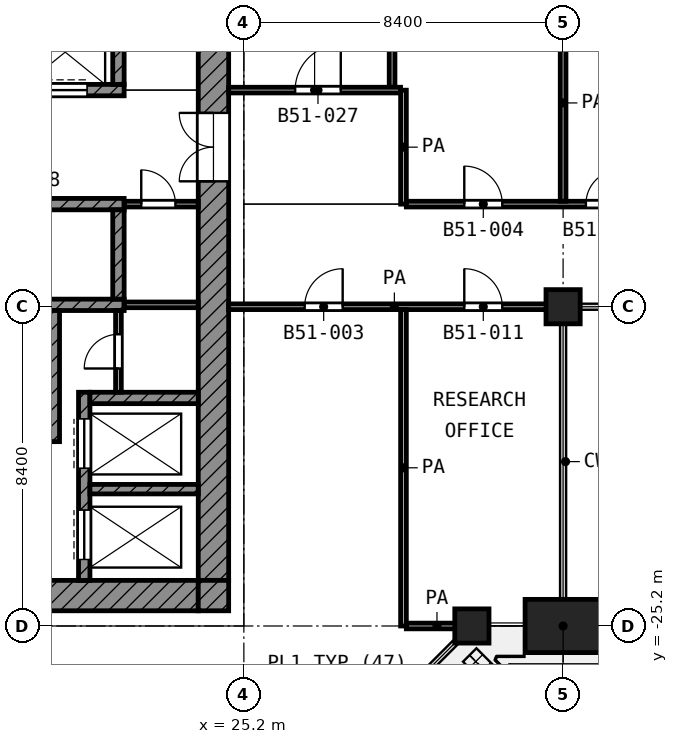
"""IFC4 building model, lengths in metres.
Left out: names, types, materials, properties, quantities, classifications, styles, units other than length and angle.
Written with IfcOpenShell. Run it as: python <this file> out.ifc"""

import sys

from ifc_helpers import new_model, si_unit, direction, frame, frame_2d, origin, origin_2d, place, context, subcontext, project, spatial, rectangle, extrude, element, fill, save


model = new_model("IFC4")
c1 = context("Model", 3, precision=1e-05, world=origin(), true_north=direction((0.0, 1.0)))
c2 = subcontext(c1, "Body", "Model", "MODEL_VIEW")
j1 = project(units=[si_unit("LENGTHUNIT", "METRE"), si_unit("PLANEANGLEUNIT", "RADIAN")], contexts=[c1])
p1 = place(None, origin())
s1 = spatial("IfcSite", under=j1, at=p1, CompositionType="ELEMENT")
p2 = place(p1, origin())
s2 = spatial("IfcBuilding", under=s1, at=p2, CompositionType="ELEMENT")
p3 = place(p2, frame((0.0, 0.0, 222.2)))
s3 = spatial("IfcBuildingStorey", under=s2, at=p3, CompositionType="ELEMENT", Elevation=222.2)
for number, where, z_axis, x_axis in (
    (1, (33.6, -16.8, 0.0), (0.0, 0.0, 1.0), (1.0, 0.0, 0.0)),
    (2, (31.2, -25.2, 0.0), (0.0, 0.0, 1.0), (1.0, 0.0, 0.0)),
):
    element("IfcColumn", number, at=place(p3, frame(where, z_axis=z_axis, x_axis=x_axis)), inside=s3, PredefinedType="COLUMN", context=c2, shape_type="SweptSolid", body=[
        extrude(rectangle(XDim=0.9, YDim=0.9, at=origin_2d()), origin(), (0.0, 0.0, 1.0), 4.2),
    ])
p4 = place(p3, frame((33.6, -25.2, 0.0), z_axis=(0.0, 0.0, 1.0), x_axis=(-1.0, 0.0, 0.0)))
e3 = element("IfcColumn", 3, at=p4, inside=s3, PredefinedType="COLUMN", context=c2, shape_type="SweptSolid", body=[
    extrude(rectangle(XDim=2.0, YDim=1.4, at=origin_2d()), origin(), (0.0, 0.0, 1.0), 4.2),
])
p5 = place(p3, frame((24.4, -24.0, 0.0), z_axis=(0.0, 0.0, 1.0), x_axis=(0.0, 1.0, 0.0)))
e4 = element("IfcWall", 4, at=p5, inside=s3, PredefinedType="SHEAR", context=c2, shape_type="SweptSolid", body=[
    extrude(rectangle(XDim=18.6, YDim=0.8, at=frame_2d((9.3, 0.0))), origin(), (0.0, 0.0, 1.0), 3.6),
])
p6 = place(p5, frame((10.5, 0.0, 0.0)))
e5 = element("IfcOpeningElement", 5, at=p6, cuts=e4, PredefinedType="OPENING", context=c2, shape_type="SweptSolid", body=[
    extrude(rectangle(XDim=1.8, YDim=2.1, at=frame_2d((0.9, 1.05))), frame((0.0, 0.41, 0.0), z_axis=(0.0, -1.0, 0.0), x_axis=(1.0, 0.0, 0.0)), (0.0, 0.0, 1.0), 0.82),
])
p7 = place(p3, frame((5.4, -24.4, 0.0), z_axis=(0.0, 0.0, 1.0), x_axis=(1.0, 0.0, 0.0)))
e6 = element("IfcWall", 6, at=p7, inside=s3, PredefinedType="SHEAR", context=c2, shape_type="SweptSolid", body=[
    extrude(rectangle(XDim=18.6, YDim=0.8, at=frame_2d((9.3, 0.0))), origin(), (0.0, 0.0, 1.0), 3.6),
])
p8 = place(p7, frame((6.3, 0.0, 0.0)))
e7 = element("IfcOpeningElement", 7, at=p8, cuts=e6, PredefinedType="OPENING", context=c2, shape_type="SweptSolid", body=[
    extrude(rectangle(XDim=1.8, YDim=2.1, at=frame_2d((0.9, 1.05))), frame((0.0, 0.41, 0.0), z_axis=(0.0, -1.0, 0.0), x_axis=(1.0, 0.0, 0.0)), (0.0, 0.0, 1.0), 0.82),
])
p9 = place(p3, frame((24.4, -24.8, 0.0), z_axis=(0.0, 0.0, 1.0), x_axis=(0.0, 1.0, 0.0)))
e8 = element("IfcWall", 8, at=p9, inside=s3, PredefinedType="SHEAR", context=c2, shape_type="SweptSolid", body=[
    extrude(rectangle(XDim=0.8, YDim=0.8, at=frame_2d((0.4, 0.0))), origin(), (0.0, 0.0, 1.0), 3.6),
])
p10 = place(p3, frame((5.4, -11.1, 0.0), z_axis=(0.0, 0.0, 1.0), x_axis=(1.0, 0.0, 0.0)))
e9 = element("IfcWall", 9, at=p10, inside=s3, PredefinedType="SHEAR", context=c2, shape_type="SweptSolid", body=[
    extrude(rectangle(XDim=16.65, YDim=0.3, at=frame_2d((8.325, 0.0))), origin(), (0.0, 0.0, 1.0), 3.6),
])
p11 = place(p10, frame((11.825, 0.0, 0.0)))
e10 = element("IfcOpeningElement", 10, at=p11, cuts=e9, PredefinedType="OPENING", context=c2, shape_type="SweptSolid", body=[
    extrude(rectangle(XDim=1.1, YDim=2.1, at=frame_2d((0.55, 1.05))), frame((0.0, 0.16, 0.0), z_axis=(0.0, -1.0, 0.0), x_axis=(1.0, 0.0, 0.0)), (0.0, 0.0, 1.0), 0.32),
])
p12 = place(p10, frame((14.575, 0.0, 0.0)))
e11 = element("IfcOpeningElement", 11, at=p12, cuts=e9, PredefinedType="OPENING", context=c2, shape_type="SweptSolid", body=[
    extrude(rectangle(XDim=1.1, YDim=2.1, at=frame_2d((0.55, 1.05))), frame((0.0, 0.16, 0.0), z_axis=(0.0, -1.0, 0.0), x_axis=(1.0, 0.0, 0.0)), (0.0, 0.0, 1.0), 0.32),
])
p13 = place(p10, frame((3.675, 0.0, 0.0)))
e12 = element("IfcOpeningElement", 12, at=p13, cuts=e9, PredefinedType="OPENING", context=c2, shape_type="SweptSolid", body=[
    extrude(rectangle(XDim=0.9, YDim=2.1, at=frame_2d((0.45, 1.05))), frame((0.0, 0.16, 0.0), z_axis=(0.0, -1.0, 0.0), x_axis=(1.0, 0.0, 0.0)), (0.0, 0.0, 1.0), 0.32),
])
p14 = place(p10, frame((9.175, 0.0, 0.0)))
e13 = element("IfcOpeningElement", 13, at=p14, cuts=e9, PredefinedType="OPENING", context=c2, shape_type="SweptSolid", body=[
    extrude(rectangle(XDim=0.9, YDim=2.1, at=frame_2d((0.45, 1.05))), frame((0.0, 0.16, 0.0), z_axis=(0.0, -1.0, 0.0), x_axis=(1.0, 0.0, 0.0)), (0.0, 0.0, 1.0), 0.32),
])
p15 = place(p3, frame((5.4, -14.1, 0.0), z_axis=(0.0, 0.0, 1.0), x_axis=(1.0, 0.0, 0.0)))
e14 = element("IfcWall", 14, at=p15, inside=s3, PredefinedType="SHEAR", context=c2, shape_type="SweptSolid", body=[
    extrude(rectangle(XDim=16.65, YDim=0.3, at=frame_2d((8.325, 0.0))), origin(), (0.0, 0.0, 1.0), 3.6),
])
p16 = place(p15, frame((0.825, 0.0, 0.0)))
e15 = element("IfcOpeningElement", 15, at=p16, cuts=e14, PredefinedType="OPENING", context=c2, shape_type="SweptSolid", body=[
    extrude(rectangle(XDim=1.1, YDim=2.1, at=frame_2d((0.55, 1.05))), frame((0.0, 0.16, 0.0), z_axis=(0.0, -1.0, 0.0), x_axis=(1.0, 0.0, 0.0)), (0.0, 0.0, 1.0), 0.32),
])
p17 = place(p15, frame((3.575, 0.0, 0.0)))
e16 = element("IfcOpeningElement", 16, at=p17, cuts=e14, PredefinedType="OPENING", context=c2, shape_type="SweptSolid", body=[
    extrude(rectangle(XDim=1.1, YDim=2.1, at=frame_2d((0.55, 1.05))), frame((0.0, 0.16, 0.0), z_axis=(0.0, -1.0, 0.0), x_axis=(1.0, 0.0, 0.0)), (0.0, 0.0, 1.0), 0.32),
])
p18 = place(p3, frame((5.4, -16.75, 0.0), z_axis=(0.0, 0.0, 1.0), x_axis=(1.0, 0.0, 0.0)))
e17 = element("IfcWall", 17, at=p18, inside=s3, PredefinedType="SHEAR", context=c2, shape_type="SweptSolid", body=[
    extrude(rectangle(XDim=16.65, YDim=0.3, at=frame_2d((8.325, 0.0))), origin(), (0.0, 0.0, 1.0), 3.6),
])
p19 = place(p3, frame((20.2, -20.35, 0.0), z_axis=(0.0, 0.0, 1.0), x_axis=(0.0, 1.0, 0.0)))
e18 = element("IfcWall", 18, at=p19, inside=s3, PredefinedType="SHEAR", context=c2, shape_type="SweptSolid", body=[
    extrude(rectangle(XDim=3.45, YDim=0.3, at=frame_2d((1.725, 0.0))), origin(), (0.0, 0.0, 1.0), 3.6),
])
p20 = place(p3, frame((21.9, -10.95, 0.0), z_axis=(0.0, 0.0, 1.0), x_axis=(0.0, 1.0, 0.0)))
e19 = element("IfcWall", 19, at=p20, inside=s3, PredefinedType="SHEAR", context=c2, shape_type="SweptSolid", body=[
    extrude(rectangle(XDim=2.35, YDim=0.3, at=frame_2d((1.175, 0.0))), origin(), (0.0, 0.0, 1.0), 3.6),
])
p21 = place(p3, frame((21.9, -16.6, 0.0), z_axis=(0.0, 0.0, 1.0), x_axis=(0.0, 1.0, 0.0)))
e20 = element("IfcWall", 20, at=p21, inside=s3, PredefinedType="SHEAR", context=c2, shape_type="SweptSolid", body=[
    extrude(rectangle(XDim=2.35, YDim=0.3, at=frame_2d((1.175, 0.0))), origin(), (0.0, 0.0, 1.0), 3.6),
])
p22 = place(p3, frame((21.15, -19.2, 0.0), z_axis=(0.0, 0.0, 1.0), x_axis=(1.0, 0.0, 0.0)))
e21 = element("IfcWall", 21, at=p22, inside=s3, PredefinedType="SHEAR", context=c2, shape_type="SweptSolid", body=[
    extrude(rectangle(XDim=2.85, YDim=0.3, at=frame_2d((1.425, 0.0))), origin(), (0.0, 0.0, 1.0), 3.6),
])
p23 = place(p3, frame((21.0, -24.0, 0.0), z_axis=(0.0, 0.0, 1.0), x_axis=(0.0, 1.0, 0.0)))
e22 = element("IfcWall", 22, at=p23, inside=s3, PredefinedType="SHEAR", context=c2, shape_type="SweptSolid", body=[
    extrude(rectangle(XDim=4.95, YDim=0.3, at=frame_2d((2.475, 0.0))), origin(), (0.0, 0.0, 1.0), 3.6),
])
p24 = place(p23, frame((2.95, 0.0, 0.0)))
e23 = element("IfcOpeningElement", 23, at=p24, cuts=e22, PredefinedType="OPENING", context=c2, shape_type="SweptSolid", body=[
    extrude(rectangle(XDim=1.3, YDim=2.1, at=frame_2d((0.65, 1.05))), frame((0.0, 0.16, 0.0), z_axis=(0.0, -1.0, 0.0), x_axis=(1.0, 0.0, 0.0)), (0.0, 0.0, 1.0), 0.32),
])
p25 = place(p23, frame((0.55, 0.0, 0.0)))
e24 = element("IfcOpeningElement", 24, at=p25, cuts=e22, PredefinedType="OPENING", context=c2, shape_type="SweptSolid", body=[
    extrude(rectangle(XDim=1.3, YDim=2.1, at=frame_2d((0.65, 1.05))), frame((0.0, 0.16, 0.0), z_axis=(0.0, -1.0, 0.0), x_axis=(1.0, 0.0, 0.0)), (0.0, 0.0, 1.0), 0.32),
])
p26 = place(p3, frame((21.15, -21.6, 0.0), z_axis=(0.0, 0.0, 1.0), x_axis=(1.0, 0.0, 0.0)))
e25 = element("IfcWall", 25, at=p26, inside=s3, PredefinedType="SHEAR", context=c2, shape_type="SweptSolid", body=[
    extrude(rectangle(XDim=2.85, YDim=0.25, at=frame_2d((1.425, 0.0))), origin(), (0.0, 0.0, 1.0), 3.6),
])
p27 = place(p3, frame((21.9, -19.05, 0.0), z_axis=(0.0, 0.0, 1.0), x_axis=(0.0, 1.0, 0.0)))
e26 = element("IfcWall", 26, at=p27, inside=s3, PredefinedType="PARTITIONING", context=c2, shape_type="SweptSolid", body=[
    extrude(rectangle(XDim=2.15, YDim=0.15, at=frame_2d((1.075, 0.0))), origin(), (0.0, 0.0, 1.0), 3.6),
])
p28 = place(p27, frame((0.625, 0.0, 0.0)))
e27 = element("IfcOpeningElement", 27, at=p28, cuts=e26, PredefinedType="OPENING", context=c2, shape_type="SweptSolid", body=[
    extrude(rectangle(XDim=0.9, YDim=2.1, at=frame_2d((0.45, 1.05))), frame((0.0, 0.085, 0.0), z_axis=(0.0, -1.0, 0.0), x_axis=(1.0, 0.0, 0.0)), (0.0, 0.0, 1.0), 0.17),
])
p29 = place(p3, frame((22.05, -16.75, 0.0), z_axis=(0.0, 0.0, 1.0), x_axis=(1.0, 0.0, 0.0)))
e28 = element("IfcWall", 28, at=p29, inside=s3, PredefinedType="PARTITIONING", context=c2, shape_type="SweptSolid", body=[
    extrude(rectangle(XDim=1.95, YDim=0.15, at=frame_2d((0.975, 0.0))), origin(), (0.0, 0.0, 1.0), 3.6),
])
p30 = place(p3, frame((22.05, -14.1, 0.0), z_axis=(0.0, 0.0, 1.0), x_axis=(1.0, 0.0, 0.0)))
e29 = element("IfcWall", 29, at=p30, inside=s3, PredefinedType="PARTITIONING", context=c2, shape_type="SweptSolid", body=[
    extrude(rectangle(XDim=1.95, YDim=0.15, at=frame_2d((0.975, 0.0))), origin(), (0.0, 0.0, 1.0), 3.6),
])
p31 = place(p30, frame((0.45, 0.0, 0.0)))
e30 = element("IfcOpeningElement", 30, at=p31, cuts=e29, PredefinedType="OPENING", context=c2, shape_type="SweptSolid", body=[
    extrude(rectangle(XDim=0.9, YDim=2.1, at=frame_2d((0.45, 1.05))), frame((0.0, 0.085, 0.0), z_axis=(0.0, -1.0, 0.0), x_axis=(1.0, 0.0, 0.0)), (0.0, 0.0, 1.0), 0.17),
])
p32 = place(p3, frame((29.475, -25.2, 0.0), z_axis=(0.0, 0.0, 1.0), x_axis=(1.0, 0.0, 0.0)))
e31 = element("IfcWall", 31, at=p32, inside=s3, PredefinedType="PARTITIONING", context=c2, shape_type="SweptSolid", body=[
    extrude(rectangle(XDim=1.612, YDim=0.15, at=frame_2d((0.806, 0.0))), origin(), (0.0, 0.0, 1.0), 3.6),
])
p33 = place(p3, frame((24.8, -16.8, 0.0), z_axis=(0.0, 0.0, 1.0), x_axis=(1.0, 0.0, 0.0)))
e32 = element("IfcWall", 32, at=p33, inside=s3, PredefinedType="PARTITIONING", context=c2, shape_type="SweptSolid", body=[
    extrude(rectangle(XDim=8.72, YDim=0.15, at=frame_2d((4.36, 0.0))), origin(), (0.0, 0.0, 1.0), 3.6),
])
p34 = place(p33, frame((2.0, 0.0, 0.0)))
e33 = element("IfcOpeningElement", 33, at=p34, cuts=e32, PredefinedType="OPENING", context=c2, shape_type="SweptSolid", body=[
    extrude(rectangle(XDim=1.0, YDim=2.1, at=frame_2d((0.5, 1.05))), frame((0.0, 0.085, 0.0), z_axis=(0.0, -1.0, 0.0), x_axis=(1.0, 0.0, 0.0)), (0.0, 0.0, 1.0), 0.17),
])
p35 = place(p33, frame((6.2, 0.0, 0.0)))
e34 = element("IfcOpeningElement", 34, at=p35, cuts=e32, PredefinedType="OPENING", context=c2, shape_type="SweptSolid", body=[
    extrude(rectangle(XDim=1.0, YDim=2.1, at=frame_2d((0.5, 1.05))), frame((0.0, 0.085, 0.0), z_axis=(0.0, -1.0, 0.0), x_axis=(1.0, 0.0, 0.0)), (0.0, 0.0, 1.0), 0.17),
])
p36 = place(p3, frame((29.475, -14.1, 0.0), z_axis=(0.0, 0.0, 1.0), x_axis=(1.0, 0.0, 0.0)))
e35 = element("IfcWall", 35, at=p36, inside=s3, PredefinedType="PARTITIONING", context=c2, shape_type="SweptSolid", body=[
    extrude(rectangle(XDim=10.757, YDim=0.15, at=frame_2d((5.378, 0.0))), origin(), (0.0, 0.0, 1.0), 3.6),
])
p37 = place(p36, frame((1.525, 0.0, 0.0)))
e36 = element("IfcOpeningElement", 36, at=p37, cuts=e35, PredefinedType="OPENING", context=c2, shape_type="SweptSolid", body=[
    extrude(rectangle(XDim=1.0, YDim=2.1, at=frame_2d((0.5, 1.05))), frame((0.0, 0.085, 0.0), z_axis=(0.0, -1.0, 0.0), x_axis=(1.0, 0.0, 0.0)), (0.0, 0.0, 1.0), 0.17),
])
p38 = place(p36, frame((4.725, 0.0, 0.0)))
e37 = element("IfcOpeningElement", 37, at=p38, cuts=e35, PredefinedType="OPENING", context=c2, shape_type="SweptSolid", body=[
    extrude(rectangle(XDim=0.9, YDim=2.1, at=frame_2d((0.45, 1.05))), frame((0.0, 0.085, 0.0), z_axis=(0.0, -1.0, 0.0), x_axis=(1.0, 0.0, 0.0)), (0.0, 0.0, 1.0), 0.17),
])
p39 = place(p36, frame((6.775, 0.0, 0.0)))
e38 = element("IfcOpeningElement", 38, at=p39, cuts=e35, PredefinedType="OPENING", context=c2, shape_type="SweptSolid", body=[
    extrude(rectangle(XDim=1.0, YDim=2.1, at=frame_2d((0.5, 1.05))), frame((0.0, 0.085, 0.0), z_axis=(0.0, -1.0, 0.0), x_axis=(1.0, 0.0, 0.0)), (0.0, 0.0, 1.0), 0.17),
])
p40 = place(p3, frame((24.8, -11.1, 0.0), z_axis=(0.0, 0.0, 1.0), x_axis=(1.0, 0.0, 0.0)))
e39 = element("IfcWall", 39, at=p40, inside=s3, PredefinedType="PARTITIONING", context=c2, shape_type="SweptSolid", body=[
    extrude(rectangle(XDim=4.523, YDim=0.15, at=frame_2d((2.261, 0.0))), origin(), (0.0, 0.0, 1.0), 3.6),
])
p41 = place(p40, frame((1.75, 0.0, 0.0)))
e40 = element("IfcOpeningElement", 40, at=p41, cuts=e39, PredefinedType="OPENING", context=c2, shape_type="SweptSolid", body=[
    extrude(rectangle(XDim=1.2, YDim=2.1, at=frame_2d((0.6, 1.05))), frame((0.0, 0.085, 0.0), z_axis=(0.0, -1.0, 0.0), x_axis=(1.0, 0.0, 0.0)), (0.0, 0.0, 1.0), 0.17),
])
p42 = place(p3, frame((29.1, -11.025, 0.0), z_axis=(0.0, 0.0, 1.0), x_axis=(0.0, 1.0, 0.0)))
e41 = element("IfcWall", 41, at=p42, inside=s3, PredefinedType="PARTITIONING", context=c2, shape_type="SweptSolid", body=[
    extrude(rectangle(XDim=10.945, YDim=0.15, at=frame_2d((5.472, 0.0))), origin(), (0.0, 0.0, 1.0), 3.6),
])
p43 = place(p3, frame((29.4, -25.2, 0.0), z_axis=(0.0, 0.0, 1.0), x_axis=(0.0, 1.0, 0.0)))
e42 = element("IfcWall", 42, at=p43, inside=s3, PredefinedType="PARTITIONING", context=c2, shape_type="SweptSolid", body=[
    extrude(rectangle(XDim=8.325, YDim=0.15, at=frame_2d((4.163, 0.0))), origin(), (0.0, 0.0, 1.0), 3.6),
])
p44 = place(p3, frame((29.4, -14.1, 0.0), z_axis=(0.0, 0.0, 1.0), x_axis=(0.0, 1.0, 0.0)))
e43 = element("IfcWall", 43, at=p44, inside=s3, PredefinedType="PARTITIONING", context=c2, shape_type="SweptSolid", body=[
    extrude(rectangle(XDim=2.998, YDim=0.15, at=frame_2d((1.499, 0.0))), origin(), (0.0, 0.0, 1.0), 3.6),
])
p45 = place(p3, frame((33.6, -14.025, 0.0), z_axis=(0.0, 0.0, 1.0), x_axis=(0.0, 1.0, 0.0)))
e44 = element("IfcWall", 44, at=p45, inside=s3, PredefinedType="PARTITIONING", context=c2, shape_type="SweptSolid", body=[
    extrude(rectangle(XDim=5.175, YDim=0.15, at=frame_2d((2.587, 0.0))), origin(), (0.0, 0.0, 1.0), 3.6),
])
p46 = place(p12, origin())
e45 = element("IfcDoor", 45, at=p46, inside=s3, OperationType="DOUBLE_DOOR_SLIDING", PredefinedType="DOOR", context=c2, shape_type="SweptSolid", body=[
    extrude(rectangle(XDim=1.1, YDim=2.1, at=frame_2d((0.55, 1.05))), frame((0.0, 0.025, 0.0), z_axis=(0.0, -1.0, 0.0), x_axis=(1.0, 0.0, 0.0)), (0.0, 0.0, 1.0), 0.05),
])
fill(e11, e45)
p47 = place(p24, origin())
e46 = element("IfcDoor", 46, at=p47, inside=s3, OperationType="DOUBLE_DOOR_SLIDING", PredefinedType="DOOR", context=c2, shape_type="SweptSolid", body=[
    extrude(rectangle(XDim=1.3, YDim=2.1, at=frame_2d((0.65, 1.05))), frame((0.0, 0.025, 0.0), z_axis=(0.0, -1.0, 0.0), x_axis=(1.0, 0.0, 0.0)), (0.0, 0.0, 1.0), 0.05),
])
fill(e23, e46)
p48 = place(p25, origin())
e47 = element("IfcDoor", 47, at=p48, inside=s3, OperationType="DOUBLE_DOOR_SLIDING", PredefinedType="DOOR", context=c2, shape_type="SweptSolid", body=[
    extrude(rectangle(XDim=1.3, YDim=2.1, at=frame_2d((0.65, 1.05))), frame((0.0, 0.025, 0.0), z_axis=(0.0, -1.0, 0.0), x_axis=(1.0, 0.0, 0.0)), (0.0, 0.0, 1.0), 0.05),
])
fill(e24, e47)
p49 = place(p6, origin())
e48 = element("IfcDoor", 48, at=p49, inside=s3, OperationType="DOUBLE_DOOR_SINGLE_SWING", PredefinedType="DOOR", context=c2, shape_type="SweptSolid", body=[
    extrude(rectangle(XDim=1.8, YDim=2.1, at=frame_2d((0.9, 1.05))), frame((0.0, 0.025, 0.0), z_axis=(0.0, -1.0, 0.0), x_axis=(1.0, 0.0, 0.0)), (0.0, 0.0, 1.0), 0.05),
])
fill(e5, e48)
p50 = place(p31, origin())
e49 = element("IfcDoor", 49, at=p50, inside=s3, OperationType="SINGLE_SWING_LEFT", PredefinedType="DOOR", context=c2, shape_type="SweptSolid", body=[
    extrude(rectangle(XDim=0.9, YDim=2.1, at=frame_2d((0.45, 1.05))), frame((0.0, 0.025, 0.0), z_axis=(0.0, -1.0, 0.0), x_axis=(1.0, 0.0, 0.0)), (0.0, 0.0, 1.0), 0.05),
])
fill(e30, e49)
p51 = place(p28, origin())
e50 = element("IfcDoor", 50, at=p51, inside=s3, OperationType="SINGLE_SWING_LEFT", PredefinedType="DOOR", context=c2, shape_type="SweptSolid", body=[
    extrude(rectangle(XDim=0.9, YDim=2.1, at=frame_2d((0.45, 1.05))), frame((0.0, 0.025, 0.0), z_axis=(0.0, -1.0, 0.0), x_axis=(1.0, 0.0, 0.0)), (0.0, 0.0, 1.0), 0.05),
])
fill(e27, e50)
p52 = place(p34, origin())
e51 = element("IfcDoor", 51, at=p52, inside=s3, OperationType="SINGLE_SWING_RIGHT", PredefinedType="DOOR", context=c2, shape_type="SweptSolid", body=[
    extrude(rectangle(XDim=1.0, YDim=2.1, at=frame_2d((0.5, 1.05))), frame((0.0, 0.025, 0.0), z_axis=(0.0, -1.0, 0.0), x_axis=(1.0, 0.0, 0.0)), (0.0, 0.0, 1.0), 0.05),
])
fill(e33, e51)
p53 = place(p41, origin())
e52 = element("IfcDoor", 52, at=p53, inside=s3, OperationType="SINGLE_SWING_RIGHT", PredefinedType="DOOR", context=c2, shape_type="SweptSolid", body=[
    extrude(rectangle(XDim=1.2, YDim=2.1, at=frame_2d((0.6, 1.05))), frame((0.0, 0.025, 0.0), z_axis=(0.0, -1.0, 0.0), x_axis=(1.0, 0.0, 0.0)), (0.0, 0.0, 1.0), 0.05),
])
fill(e40, e52)
p54 = place(p37, origin())
e53 = element("IfcDoor", 53, at=p54, inside=s3, OperationType="SINGLE_SWING_LEFT", PredefinedType="DOOR", context=c2, shape_type="SweptSolid", body=[
    extrude(rectangle(XDim=1.0, YDim=2.1, at=frame_2d((0.5, 1.05))), frame((0.0, 0.025, 0.0), z_axis=(0.0, -1.0, 0.0), x_axis=(1.0, 0.0, 0.0)), (0.0, 0.0, 1.0), 0.05),
])
fill(e36, e53)
p55 = place(p35, origin())
e54 = element("IfcDoor", 54, at=p55, inside=s3, OperationType="SINGLE_SWING_LEFT", PredefinedType="DOOR", context=c2, shape_type="SweptSolid", body=[
    extrude(rectangle(XDim=1.0, YDim=2.1, at=frame_2d((0.5, 1.05))), frame((0.0, 0.025, 0.0), z_axis=(0.0, -1.0, 0.0), x_axis=(1.0, 0.0, 0.0)), (0.0, 0.0, 1.0), 0.05),
])
fill(e34, e54)
p56 = place(p38, origin())
e55 = element("IfcDoor", 55, at=p56, inside=s3, OperationType="SINGLE_SWING_RIGHT", PredefinedType="DOOR", context=c2, shape_type="SweptSolid", body=[
    extrude(rectangle(XDim=0.9, YDim=2.1, at=frame_2d((0.45, 1.05))), frame((0.0, 0.025, 0.0), z_axis=(0.0, -1.0, 0.0), x_axis=(1.0, 0.0, 0.0)), (0.0, 0.0, 1.0), 0.05),
])
fill(e37, e55)
save(model, sys.argv[1])
